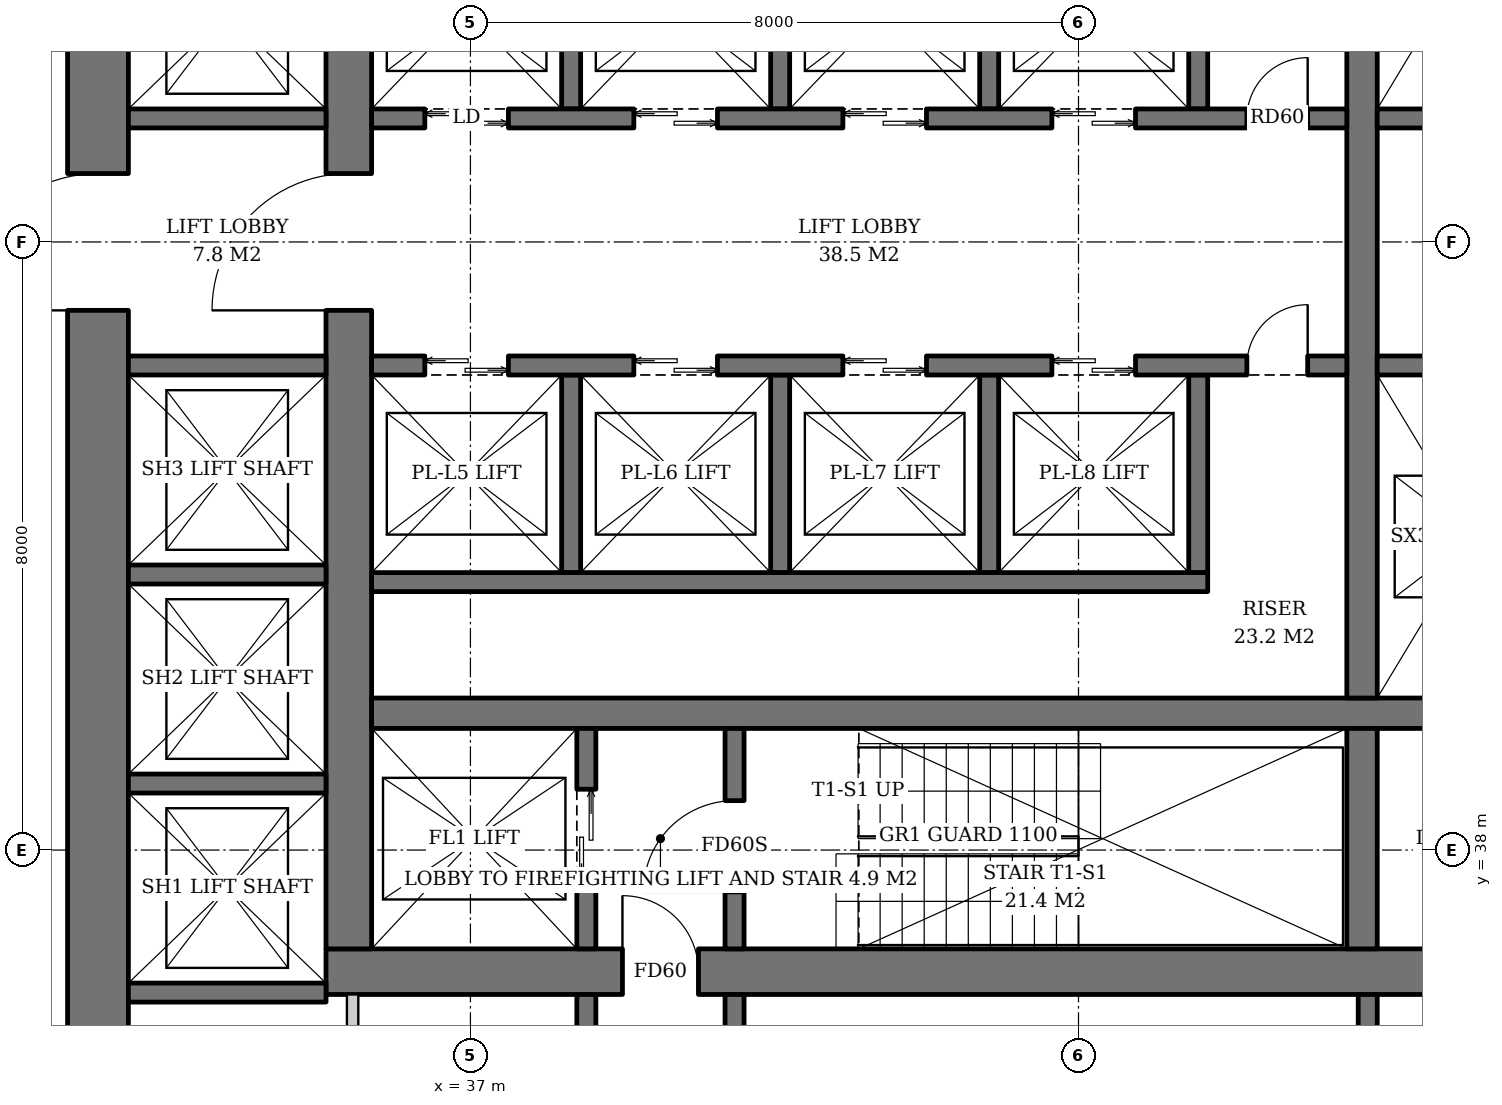
"""IFC4 building model, lengths in metres.
Left out: names, types, materials, properties, quantities, classifications, styles, units other than length and angle.
Written with IfcOpenShell. Run it as: python <this file> out.ifc"""

import sys

from ifc_helpers import new_model, si_unit, direction, frame, frame_2d, origin, place, context, subcontext, project, spatial, rectangle, extrude, element, fill, save


model = new_model("IFC4")
c1 = context("Model", 3, precision=1e-05, world=origin(), true_north=direction((0.0, 1.0)))
c2 = subcontext(c1, "Body", "Model", "MODEL_VIEW")
j1 = project(units=[si_unit("LENGTHUNIT", "METRE"), si_unit("PLANEANGLEUNIT", "RADIAN")], contexts=[c1])
p1 = place(None, origin())
s1 = spatial("IfcSite", under=j1, at=p1, CompositionType="ELEMENT")
p2 = place(p1, origin())
s2 = spatial("IfcBuilding", under=s1, at=p2, CompositionType="ELEMENT")
p3 = place(p2, frame((0.0, 0.0, 24.8)))
s3 = spatial("IfcBuildingStorey", under=s2, at=p3, CompositionType="ELEMENT", Elevation=24.8)
p4 = place(p3, frame((35.1, 36.4, 0.0), z_axis=(0.0, 0.0, 1.0), x_axis=(1.0, 0.0, 0.0)))
e1 = element("IfcWall", 1, at=p4, inside=s3, PredefinedType="SHEAR", context=c2, shape_type="SweptSolid", body=[
    extrude(rectangle(XDim=19.8, YDim=0.6, at=frame_2d((9.9, 0.0))), origin(), (0.0, 0.0, 1.0), 3.8),
])
p5 = place(p4, frame((3.9, 0.0, 0.0)))
e2 = element("IfcOpeningElement", 2, at=p5, cuts=e1, PredefinedType="OPENING", context=c2, shape_type="SweptSolid", body=[
    extrude(rectangle(XDim=1.0, YDim=2.1, at=frame_2d((0.5, 1.05))), frame((0.0, 0.31, 0.0), z_axis=(0.0, -1.0, 0.0), x_axis=(1.0, 0.0, 0.0)), (0.0, 0.0, 1.0), 0.62),
])
p6 = place(p4, frame((15.35, 0.0, 0.0)))
e3 = element("IfcOpeningElement", 3, at=p6, cuts=e1, PredefinedType="OPENING", context=c2, shape_type="SweptSolid", body=[
    extrude(rectangle(XDim=1.0, YDim=2.1, at=frame_2d((0.5, 1.05))), frame((0.0, 0.31, 0.0), z_axis=(0.0, -1.0, 0.0), x_axis=(1.0, 0.0, 0.0)), (0.0, 0.0, 1.0), 0.62),
])
p7 = place(p3, frame((35.4, 36.7, 0.0), z_axis=(0.0, 0.0, 1.0), x_axis=(0.0, 1.0, 0.0)))
e4 = element("IfcWall", 4, at=p7, inside=s3, PredefinedType="SHEAR", context=c2, shape_type="SweptSolid", body=[
    extrude(rectangle(XDim=18.6, YDim=0.6, at=frame_2d((9.3, 0.0))), origin(), (0.0, 0.0, 1.0), 3.8),
])
p8 = place(p7, frame((8.4, 0.0, 0.0)))
e5 = element("IfcOpeningElement", 5, at=p8, cuts=e4, PredefinedType="OPENING", context=c2, shape_type="SweptSolid", body=[
    extrude(rectangle(XDim=1.8, YDim=2.4, at=frame_2d((0.9, 1.2))), frame((0.0, 0.31, 0.0), z_axis=(0.0, -1.0, 0.0), x_axis=(1.0, 0.0, 0.0)), (0.0, 0.0, 1.0), 0.62),
])
p9 = place(p3, frame((32.1, 33.5, 0.0), z_axis=(0.0, 0.0, 1.0), x_axis=(0.0, 1.0, 0.0)))
e6 = element("IfcWall", 6, at=p9, inside=s3, PredefinedType="SHEAR", context=c2, shape_type="SweptSolid", body=[
    extrude(rectangle(XDim=25.0, YDim=0.8, at=frame_2d((12.5, 0.0))), origin(), (0.0, 0.0, 1.0), 3.8),
])
p10 = place(p9, frame((11.6, 0.0, 0.0)))
e7 = element("IfcOpeningElement", 7, at=p10, cuts=e6, PredefinedType="OPENING", context=c2, shape_type="SweptSolid", body=[
    extrude(rectangle(XDim=1.8, YDim=2.4, at=frame_2d((0.9, 1.2))), frame((0.0, 0.41, 0.0), z_axis=(0.0, -1.0, 0.0), x_axis=(1.0, 0.0, 0.0)), (0.0, 0.0, 1.0), 0.82),
])
p11 = place(p3, frame((35.7, 39.8, 0.0), z_axis=(0.0, 0.0, 1.0), x_axis=(1.0, 0.0, 0.0)))
e8 = element("IfcWall", 8, at=p11, inside=s3, PredefinedType="SHEAR", context=c2, shape_type="SweptSolid", body=[
    extrude(rectangle(XDim=18.6, YDim=0.4, at=frame_2d((9.3, 0.0))), origin(), (0.0, 0.0, 1.0), 3.8),
])
p12 = place(p3, frame((48.73, 36.7, 0.0), z_axis=(0.0, 0.0, 1.0), x_axis=(0.0, 1.0, 0.0)))
e9 = element("IfcWall", 9, at=p12, inside=s3, PredefinedType="SHEAR", context=c2, shape_type="SweptSolid", body=[
    extrude(rectangle(XDim=2.9, YDim=0.4, at=frame_2d((1.45, 0.0))), origin(), (0.0, 0.0, 1.0), 3.8),
])
p13 = place(p3, frame((48.73, 40.0, 0.0), z_axis=(0.0, 0.0, 1.0), x_axis=(0.0, 1.0, 0.0)))
e10 = element("IfcWall", 10, at=p13, inside=s3, PredefinedType="SHEAR", context=c2, shape_type="SweptSolid", body=[
    extrude(rectangle(XDim=12.0, YDim=0.4, at=frame_2d((6.0, 0.0))), origin(), (0.0, 0.0, 1.0), 3.8),
])
p14 = place(p3, frame((38.525, 36.7, 0.0), z_axis=(0.0, 0.0, 1.0), x_axis=(0.0, 1.0, 0.0)))
e11 = element("IfcWall", 11, at=p14, inside=s3, PredefinedType="SHEAR", context=c2, shape_type="SweptSolid", body=[
    extrude(rectangle(XDim=2.9, YDim=0.25, at=frame_2d((1.45, 0.0))), origin(), (0.0, 0.0, 1.0), 3.8),
])
p15 = place(p14, frame((0.8, 0.0, 0.0)))
e12 = element("IfcOpeningElement", 12, at=p15, cuts=e11, PredefinedType="OPENING", context=c2, shape_type="SweptSolid", body=[
    extrude(rectangle(XDim=1.3, YDim=2.2, at=frame_2d((0.65, 1.1))), frame((0.0, 0.135, 0.0), z_axis=(0.0, -1.0, 0.0), x_axis=(1.0, 0.0, 0.0)), (0.0, 0.0, 1.0), 0.27),
])
p16 = place(p3, frame((40.475, 36.7, 0.0), z_axis=(0.0, 0.0, 1.0), x_axis=(0.0, 1.0, 0.0)))
e13 = element("IfcWall", 13, at=p16, inside=s3, PredefinedType="SHEAR", context=c2, shape_type="SweptSolid", body=[
    extrude(rectangle(XDim=2.9, YDim=0.25, at=frame_2d((1.45, 0.0))), origin(), (0.0, 0.0, 1.0), 3.8),
])
p17 = place(p16, frame((0.75, 0.0, 0.0)))
e14 = element("IfcOpeningElement", 14, at=p17, cuts=e13, PredefinedType="OPENING", context=c2, shape_type="SweptSolid", body=[
    extrude(rectangle(XDim=1.2, YDim=2.1, at=frame_2d((0.6, 1.05))), frame((0.0, 0.135, 0.0), z_axis=(0.0, -1.0, 0.0), x_axis=(1.0, 0.0, 0.0)), (0.0, 0.0, 1.0), 0.27),
])
for number, where, z_axis, x_axis in (
    (15, (38.325, 47.75, 0.0), (0.0, 0.0, 1.0), (0.0, 1.0, 0.0)),
    (16, (41.075, 47.75, 0.0), (0.0, 0.0, 1.0), (0.0, 1.0, 0.0)),
    (17, (43.825, 47.75, 0.0), (0.0, 0.0, 1.0), (0.0, 1.0, 0.0)),
    (18, (46.575, 47.75, 0.0), (0.0, 0.0, 1.0), (0.0, 1.0, 0.0)),
):
    element("IfcWall", number, at=place(p3, frame(where, z_axis=z_axis, x_axis=x_axis)), inside=s3, PredefinedType="SHEAR", context=c2, shape_type="SweptSolid", body=[
        extrude(rectangle(XDim=2.6, YDim=0.25, at=frame_2d((1.3, 0.0))), origin(), (0.0, 0.0, 1.0), 3.8),
    ])
p18 = place(p3, frame((35.7, 47.625, 0.0), z_axis=(0.0, 0.0, 1.0), x_axis=(1.0, 0.0, 0.0)))
e19 = element("IfcWall", 19, at=p18, inside=s3, PredefinedType="SHEAR", context=c2, shape_type="SweptSolid", body=[
    extrude(rectangle(XDim=12.83, YDim=0.25, at=frame_2d((6.415, 0.0))), origin(), (0.0, 0.0, 1.0), 3.8),
])
p19 = place(p18, frame((0.7, 0.0, 0.0)))
e20 = element("IfcOpeningElement", 20, at=p19, cuts=e19, PredefinedType="OPENING", context=c2, shape_type="SweptSolid", body=[
    extrude(rectangle(XDim=1.1, YDim=2.2, at=frame_2d((0.55, 1.1))), frame((0.0, 0.135, 0.0), z_axis=(0.0, -1.0, 0.0), x_axis=(1.0, 0.0, 0.0)), (0.0, 0.0, 1.0), 0.27),
])
p20 = place(p18, frame((3.45, 0.0, 0.0)))
e21 = element("IfcOpeningElement", 21, at=p20, cuts=e19, PredefinedType="OPENING", context=c2, shape_type="SweptSolid", body=[
    extrude(rectangle(XDim=1.1, YDim=2.2, at=frame_2d((0.55, 1.1))), frame((0.0, 0.135, 0.0), z_axis=(0.0, -1.0, 0.0), x_axis=(1.0, 0.0, 0.0)), (0.0, 0.0, 1.0), 0.27),
])
p21 = place(p18, frame((6.2, 0.0, 0.0)))
e22 = element("IfcOpeningElement", 22, at=p21, cuts=e19, PredefinedType="OPENING", context=c2, shape_type="SweptSolid", body=[
    extrude(rectangle(XDim=1.1, YDim=2.2, at=frame_2d((0.55, 1.1))), frame((0.0, 0.135, 0.0), z_axis=(0.0, -1.0, 0.0), x_axis=(1.0, 0.0, 0.0)), (0.0, 0.0, 1.0), 0.27),
])
p22 = place(p18, frame((8.95, 0.0, 0.0)))
e23 = element("IfcOpeningElement", 23, at=p22, cuts=e19, PredefinedType="OPENING", context=c2, shape_type="SweptSolid", body=[
    extrude(rectangle(XDim=1.1, YDim=2.2, at=frame_2d((0.55, 1.1))), frame((0.0, 0.135, 0.0), z_axis=(0.0, -1.0, 0.0), x_axis=(1.0, 0.0, 0.0)), (0.0, 0.0, 1.0), 0.27),
])
p23 = place(p18, frame((11.515, 0.0, 0.0)))
e24 = element("IfcOpeningElement", 24, at=p23, cuts=e19, PredefinedType="OPENING", context=c2, shape_type="SweptSolid", body=[
    extrude(rectangle(XDim=0.8, YDim=2.0, at=frame_2d((0.4, 1.0))), frame((0.0, 0.135, 0.0), z_axis=(0.0, -1.0, 0.0), x_axis=(1.0, 0.0, 0.0)), (0.0, 0.0, 1.0), 0.27),
])
for number, where, z_axis, x_axis in (
    (25, (38.325, 44.25, 0.0), (0.0, 0.0, 1.0), (0.0, -1.0, 0.0)),
    (26, (41.075, 44.25, 0.0), (0.0, 0.0, 1.0), (0.0, -1.0, 0.0)),
    (27, (43.825, 44.25, 0.0), (0.0, 0.0, 1.0), (0.0, -1.0, 0.0)),
    (28, (46.575, 44.25, 0.0), (0.0, 0.0, 1.0), (0.0, -1.0, 0.0)),
):
    element("IfcWall", number, at=place(p3, frame(where, z_axis=z_axis, x_axis=x_axis)), inside=s3, PredefinedType="SHEAR", context=c2, shape_type="SweptSolid", body=[
        extrude(rectangle(XDim=2.6, YDim=0.25, at=frame_2d((1.3, 0.0))), origin(), (0.0, 0.0, 1.0), 3.8),
    ])
p24 = place(p3, frame((35.7, 41.525, 0.0), z_axis=(0.0, 0.0, 1.0), x_axis=(1.0, 0.0, 0.0)))
e29 = element("IfcWall", 29, at=p24, inside=s3, PredefinedType="SHEAR", context=c2, shape_type="SweptSolid", body=[
    extrude(rectangle(XDim=11.0, YDim=0.25, at=frame_2d((5.5, 0.0))), origin(), (0.0, 0.0, 1.0), 3.8),
])
p25 = place(p3, frame((35.7, 44.375, 0.0), z_axis=(0.0, 0.0, 1.0), x_axis=(1.0, 0.0, 0.0)))
e30 = element("IfcWall", 30, at=p25, inside=s3, PredefinedType="SHEAR", context=c2, shape_type="SweptSolid", body=[
    extrude(rectangle(XDim=12.83, YDim=0.25, at=frame_2d((6.415, 0.0))), origin(), (0.0, 0.0, 1.0), 3.8),
])
p26 = place(p25, frame((0.7, 0.0, 0.0)))
e31 = element("IfcOpeningElement", 31, at=p26, cuts=e30, PredefinedType="OPENING", context=c2, shape_type="SweptSolid", body=[
    extrude(rectangle(XDim=1.1, YDim=2.2, at=frame_2d((0.55, 1.1))), frame((0.0, 0.135, 0.0), z_axis=(0.0, -1.0, 0.0), x_axis=(1.0, 0.0, 0.0)), (0.0, 0.0, 1.0), 0.27),
])
p27 = place(p25, frame((3.45, 0.0, 0.0)))
e32 = element("IfcOpeningElement", 32, at=p27, cuts=e30, PredefinedType="OPENING", context=c2, shape_type="SweptSolid", body=[
    extrude(rectangle(XDim=1.1, YDim=2.2, at=frame_2d((0.55, 1.1))), frame((0.0, 0.135, 0.0), z_axis=(0.0, -1.0, 0.0), x_axis=(1.0, 0.0, 0.0)), (0.0, 0.0, 1.0), 0.27),
])
p28 = place(p25, frame((6.2, 0.0, 0.0)))
e33 = element("IfcOpeningElement", 33, at=p28, cuts=e30, PredefinedType="OPENING", context=c2, shape_type="SweptSolid", body=[
    extrude(rectangle(XDim=1.1, YDim=2.2, at=frame_2d((0.55, 1.1))), frame((0.0, 0.135, 0.0), z_axis=(0.0, -1.0, 0.0), x_axis=(1.0, 0.0, 0.0)), (0.0, 0.0, 1.0), 0.27),
])
p29 = place(p25, frame((8.95, 0.0, 0.0)))
e34 = element("IfcOpeningElement", 34, at=p29, cuts=e30, PredefinedType="OPENING", context=c2, shape_type="SweptSolid", body=[
    extrude(rectangle(XDim=1.1, YDim=2.2, at=frame_2d((0.55, 1.1))), frame((0.0, 0.135, 0.0), z_axis=(0.0, -1.0, 0.0), x_axis=(1.0, 0.0, 0.0)), (0.0, 0.0, 1.0), 0.27),
])
p30 = place(p25, frame((11.515, 0.0, 0.0)))
e35 = element("IfcOpeningElement", 35, at=p30, cuts=e30, PredefinedType="OPENING", context=c2, shape_type="SweptSolid", body=[
    extrude(rectangle(XDim=0.8, YDim=2.0, at=frame_2d((0.4, 1.0))), frame((0.0, 0.135, 0.0), z_axis=(0.0, -1.0, 0.0), x_axis=(1.0, 0.0, 0.0)), (0.0, 0.0, 1.0), 0.27),
])
for number, where, z_axis, x_axis in (
    (36, (48.93, 47.625, 0.0), (0.0, 0.0, 1.0), (1.0, 0.0, 0.0)),
    (37, (48.93, 44.375, 0.0), (0.0, 0.0, 1.0), (1.0, 0.0, 0.0)),
):
    element("IfcWall", number, at=place(p3, frame(where, z_axis=z_axis, x_axis=x_axis)), inside=s3, PredefinedType="SHEAR", context=c2, shape_type="SweptSolid", body=[
        extrude(rectangle(XDim=5.37, YDim=0.25, at=frame_2d((2.685, 0.0))), origin(), (0.0, 0.0, 1.0), 3.8),
    ])
for number, where, z_axis, x_axis in (
    (38, (32.5, 36.125, 0.0), (0.0, 0.0, 1.0), (1.0, 0.0, 0.0)),
    (39, (32.5, 38.875, 0.0), (0.0, 0.0, 1.0), (1.0, 0.0, 0.0)),
    (40, (32.5, 41.625, 0.0), (0.0, 0.0, 1.0), (1.0, 0.0, 0.0)),
    (41, (32.5, 44.375, 0.0), (0.0, 0.0, 1.0), (1.0, 0.0, 0.0)),
    (42, (32.5, 47.625, 0.0), (0.0, 0.0, 1.0), (1.0, 0.0, 0.0)),
):
    element("IfcWall", number, at=place(p3, frame(where, z_axis=z_axis, x_axis=x_axis)), inside=s3, PredefinedType="SHEAR", context=c2, shape_type="SweptSolid", body=[
        extrude(rectangle(XDim=2.6, YDim=0.25, at=frame_2d((1.3, 0.0))), origin(), (0.0, 0.0, 1.0), 3.8),
    ])
for number, where, z_axis, x_axis in (
    (43, (38.525, 33.5, 0.0), (0.0, 0.0, 1.0), (0.0, 1.0, 0.0)),
    (44, (40.475, 33.5, 0.0), (0.0, 0.0, 1.0), (0.0, 1.0, 0.0)),
    (45, (48.805, 33.5, 0.0), (0.0, 0.0, 1.0), (0.0, 1.0, 0.0)),
):
    element("IfcWall", number, at=place(p3, frame(where, z_axis=z_axis, x_axis=x_axis)), inside=s3, PredefinedType="SOLIDWALL", context=c2, shape_type="SweptSolid", body=[
        extrude(rectangle(XDim=2.6, YDim=0.25, at=frame_2d((1.3, 0.0))), origin(), (0.0, 0.0, 1.0), 3.62),
    ])
p31 = place(p3, frame((35.45, 33.5, 0.0), z_axis=(0.0, 0.0, 1.0), x_axis=(0.0, 1.0, 0.0)))
e46 = element("IfcWall", 46, at=p31, inside=s3, PredefinedType="SOLIDWALL", context=c2, shape_type="SweptSolid", body=[
    extrude(rectangle(XDim=2.6, YDim=0.15, at=frame_2d((1.3, 0.0))), origin(), (0.0, 0.0, 1.0), 3.62),
])
p32 = place(p15, origin())
e47 = element("IfcDoor", 47, at=p32, inside=s3, OperationType="DOUBLE_DOOR_SLIDING", PredefinedType="DOOR", context=c2, shape_type="SweptSolid", body=[
    extrude(rectangle(XDim=1.3, YDim=2.2, at=frame_2d((0.65, 1.1))), frame((0.0, 0.025, 0.0), z_axis=(0.0, -1.0, 0.0), x_axis=(1.0, 0.0, 0.0)), (0.0, 0.0, 1.0), 0.05),
])
fill(e12, e47)
p33 = place(p17, origin())
e48 = element("IfcDoor", 48, at=p33, inside=s3, OperationType="SINGLE_SWING_LEFT", PredefinedType="DOOR", context=c2, shape_type="SweptSolid", body=[
    extrude(rectangle(XDim=1.2, YDim=2.1, at=frame_2d((0.6, 1.05))), frame((0.0, 0.025, 0.0), z_axis=(0.0, -1.0, 0.0), x_axis=(1.0, 0.0, 0.0)), (0.0, 0.0, 1.0), 0.05),
])
fill(e14, e48)
p34 = place(p19, origin())
e49 = element("IfcDoor", 49, at=p34, inside=s3, OperationType="DOUBLE_DOOR_SLIDING", PredefinedType="DOOR", context=c2, shape_type="SweptSolid", body=[
    extrude(rectangle(XDim=1.1, YDim=2.2, at=frame_2d((0.55, 1.1))), frame((0.0, 0.025, 0.0), z_axis=(0.0, -1.0, 0.0), x_axis=(1.0, 0.0, 0.0)), (0.0, 0.0, 1.0), 0.05),
])
fill(e20, e49)
p35 = place(p20, origin())
e50 = element("IfcDoor", 50, at=p35, inside=s3, OperationType="DOUBLE_DOOR_SLIDING", PredefinedType="DOOR", context=c2, shape_type="SweptSolid", body=[
    extrude(rectangle(XDim=1.1, YDim=2.2, at=frame_2d((0.55, 1.1))), frame((0.0, 0.025, 0.0), z_axis=(0.0, -1.0, 0.0), x_axis=(1.0, 0.0, 0.0)), (0.0, 0.0, 1.0), 0.05),
])
fill(e21, e50)
p36 = place(p21, origin())
e51 = element("IfcDoor", 51, at=p36, inside=s3, OperationType="DOUBLE_DOOR_SLIDING", PredefinedType="DOOR", context=c2, shape_type="SweptSolid", body=[
    extrude(rectangle(XDim=1.1, YDim=2.2, at=frame_2d((0.55, 1.1))), frame((0.0, 0.025, 0.0), z_axis=(0.0, -1.0, 0.0), x_axis=(1.0, 0.0, 0.0)), (0.0, 0.0, 1.0), 0.05),
])
fill(e22, e51)
p37 = place(p22, origin())
e52 = element("IfcDoor", 52, at=p37, inside=s3, OperationType="DOUBLE_DOOR_SLIDING", PredefinedType="DOOR", context=c2, shape_type="SweptSolid", body=[
    extrude(rectangle(XDim=1.1, YDim=2.2, at=frame_2d((0.55, 1.1))), frame((0.0, 0.025, 0.0), z_axis=(0.0, -1.0, 0.0), x_axis=(1.0, 0.0, 0.0)), (0.0, 0.0, 1.0), 0.05),
])
fill(e23, e52)
p38 = place(p23, origin())
e53 = element("IfcDoor", 53, at=p38, inside=s3, OperationType="SINGLE_SWING_RIGHT", PredefinedType="DOOR", context=c2, shape_type="SweptSolid", body=[
    extrude(rectangle(XDim=0.8, YDim=2.0, at=frame_2d((0.4, 1.0))), frame((0.0, 0.025, 0.0), z_axis=(0.0, -1.0, 0.0), x_axis=(1.0, 0.0, 0.0)), (0.0, 0.0, 1.0), 0.05),
])
fill(e24, e53)
p39 = place(p26, origin())
e54 = element("IfcDoor", 54, at=p39, inside=s3, OperationType="DOUBLE_DOOR_SLIDING", PredefinedType="DOOR", context=c2, shape_type="SweptSolid", body=[
    extrude(rectangle(XDim=1.1, YDim=2.2, at=frame_2d((0.55, 1.1))), frame((0.0, 0.025, 0.0), z_axis=(0.0, -1.0, 0.0), x_axis=(1.0, 0.0, 0.0)), (0.0, 0.0, 1.0), 0.05),
])
fill(e31, e54)
p40 = place(p27, origin())
e55 = element("IfcDoor", 55, at=p40, inside=s3, OperationType="DOUBLE_DOOR_SLIDING", PredefinedType="DOOR", context=c2, shape_type="SweptSolid", body=[
    extrude(rectangle(XDim=1.1, YDim=2.2, at=frame_2d((0.55, 1.1))), frame((0.0, 0.025, 0.0), z_axis=(0.0, -1.0, 0.0), x_axis=(1.0, 0.0, 0.0)), (0.0, 0.0, 1.0), 0.05),
])
fill(e32, e55)
p41 = place(p28, origin())
e56 = element("IfcDoor", 56, at=p41, inside=s3, OperationType="DOUBLE_DOOR_SLIDING", PredefinedType="DOOR", context=c2, shape_type="SweptSolid", body=[
    extrude(rectangle(XDim=1.1, YDim=2.2, at=frame_2d((0.55, 1.1))), frame((0.0, 0.025, 0.0), z_axis=(0.0, -1.0, 0.0), x_axis=(1.0, 0.0, 0.0)), (0.0, 0.0, 1.0), 0.05),
])
fill(e33, e56)
p42 = place(p29, origin())
e57 = element("IfcDoor", 57, at=p42, inside=s3, OperationType="DOUBLE_DOOR_SLIDING", PredefinedType="DOOR", context=c2, shape_type="SweptSolid", body=[
    extrude(rectangle(XDim=1.1, YDim=2.2, at=frame_2d((0.55, 1.1))), frame((0.0, 0.025, 0.0), z_axis=(0.0, -1.0, 0.0), x_axis=(1.0, 0.0, 0.0)), (0.0, 0.0, 1.0), 0.05),
])
fill(e34, e57)
p43 = place(p30, origin())
e58 = element("IfcDoor", 58, at=p43, inside=s3, OperationType="SINGLE_SWING_RIGHT", PredefinedType="DOOR", context=c2, shape_type="SweptSolid", body=[
    extrude(rectangle(XDim=0.8, YDim=2.0, at=frame_2d((0.4, 1.0))), frame((0.0, 0.025, 0.0), z_axis=(0.0, -1.0, 0.0), x_axis=(1.0, 0.0, 0.0)), (0.0, 0.0, 1.0), 0.05),
])
fill(e35, e58)
p44 = place(p5, origin())
e59 = element("IfcDoor", 59, at=p44, inside=s3, OperationType="SINGLE_SWING_LEFT", PredefinedType="DOOR", context=c2, shape_type="SweptSolid", body=[
    extrude(rectangle(XDim=1.0, YDim=2.1, at=frame_2d((0.5, 1.05))), frame((0.0, 0.025, 0.0), z_axis=(0.0, -1.0, 0.0), x_axis=(1.0, 0.0, 0.0)), (0.0, 0.0, 1.0), 0.05),
])
fill(e2, e59)
p45 = place(p8, origin())
e60 = element("IfcDoor", 60, at=p45, inside=s3, OperationType="DOUBLE_DOOR_SINGLE_SWING", PredefinedType="DOOR", context=c2, shape_type="SweptSolid", body=[
    extrude(rectangle(XDim=1.8, YDim=2.4, at=frame_2d((0.9, 1.2))), frame((0.0, 0.025, 0.0), z_axis=(0.0, -1.0, 0.0), x_axis=(1.0, 0.0, 0.0)), (0.0, 0.0, 1.0), 0.05),
])
fill(e5, e60)
p46 = place(p10, origin())
e61 = element("IfcDoor", 61, at=p46, inside=s3, OperationType="DOUBLE_DOOR_SINGLE_SWING", PredefinedType="DOOR", context=c2, shape_type="SweptSolid", body=[
    extrude(rectangle(XDim=1.8, YDim=2.4, at=frame_2d((0.9, 1.2))), frame((0.0, 0.025, 0.0), z_axis=(0.0, -1.0, 0.0), x_axis=(1.0, 0.0, 0.0)), (0.0, 0.0, 1.0), 0.05),
])
fill(e7, e61)
save(model, sys.argv[1])
